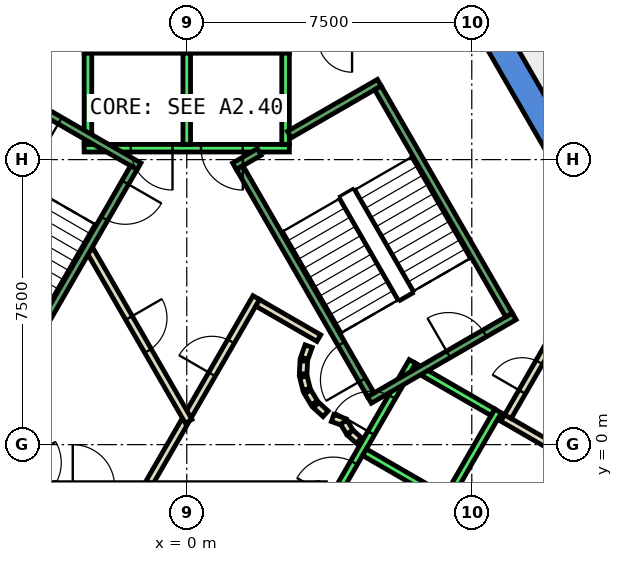
"""IFC4 building model, lengths in metres.
Left out: names, types, materials, properties, quantities, classifications, styles, units other than length and angle.
Written with IfcOpenShell. Run it as: python <this file> out.ifc"""

import sys

from ifc_helpers import new_model, si_unit, direction, frame, frame_2d, origin, place, context, subcontext, project, spatial, polyline, rectangle, outline, extrude, element, fill, save


model = new_model("IFC4")
c1 = context("Model", 3, precision=1e-05, world=origin(), true_north=direction((0.0, 1.0)))
c2 = subcontext(c1, "Body", "Model", "MODEL_VIEW")
j1 = project(units=[si_unit("LENGTHUNIT", "METRE"), si_unit("PLANEANGLEUNIT", "RADIAN")], contexts=[c1])
p1 = place(None, origin())
s1 = spatial("IfcSite", under=j1, at=p1, CompositionType="ELEMENT")
p2 = place(p1, origin())
s2 = spatial("IfcBuilding", under=s1, at=p2, CompositionType="ELEMENT")
p3 = place(p2, frame((0.0, 0.0, 198.2)))
s3 = spatial("IfcBuildingStorey", under=s2, at=p3, CompositionType="ELEMENT", Elevation=198.2)
p4 = place(p3, frame((0.0, 0.0, -0.4)))
e1 = element("IfcWall", 1, at=p4, inside=s3, PredefinedType="SHEAR", context=c2, shape_type="SweptSolid", body=[
    extrude(outline(polyline([(8.084, 11.498), (7.478, 11.148), (12.471, 2.5), (13.279, 2.5), (8.084, 11.498)])), origin(), (0.0, 0.0, 1.0), 4.2),
])
p5 = place(p3, frame((0.0, 0.0, -0.4)))
e2 = element("IfcWall", 2, at=p5, inside=s3, PredefinedType="SHEAR", context=c2, shape_type="SweptSolid", body=[
    extrude(outline(polyline([(6.64, -9.0), (13.279, 2.5), (12.471, 2.5), (6.235, -8.3), (6.64, -9.0)])), origin(), (0.0, 0.0, 1.0), 4.2),
])
p6 = place(p3, frame((10.653, -0.648, 0.0), z_axis=(0.0, 0.0, 1.0), x_axis=(-0.866036505625, 0.499980770555, 0.0)))
e3 = element("IfcWall", 3, at=p6, inside=s3, PredefinedType="PARTITIONING", context=c2, shape_type="SweptSolid", body=[
    extrude(rectangle(XDim=2.7, YDim=0.2, at=frame_2d((1.35, 0.0))), origin(), (0.0, 0.0, 1.0), 3.8),
])
p7 = place(p3, frame((8.451, 0.738, 0.0), z_axis=(0.0, 0.0, 1.0), x_axis=(0.499913221443, 0.866075499611, 0.0)))
e4 = element("IfcWall", 4, at=p7, inside=s3, PredefinedType="PARTITIONING", context=c2, shape_type="SweptSolid", body=[
    extrude(rectangle(XDim=2.4, YDim=0.2, at=frame_2d((1.2, 0.0))), origin(), (0.0, 0.0, 1.0), 3.8),
])
p8 = place(p7, frame((0.75, 0.0, 0.0)))
e5 = element("IfcOpeningElement", 5, at=p8, cuts=e4, PredefinedType="OPENING", context=c2, shape_type="SweptSolid", body=[
    extrude(rectangle(XDim=0.9, YDim=2.1, at=frame_2d((0.45, 1.05))), frame((0.0, 0.11, 0.0), z_axis=(0.0, -1.0, 0.0), x_axis=(1.0, 0.0, 0.0)), (0.0, 0.0, 1.0), 0.22),
])
p9 = place(p3, frame((-0.982, -1.0, 0.0), z_axis=(0.0, 0.0, 1.0), x_axis=(0.50024047865, 0.865886518847, 0.0)))
e6 = element("IfcWall", 6, at=p9, inside=s3, PredefinedType="PARTITIONING", context=c2, shape_type="SweptSolid", body=[
    extrude(rectangle(XDim=1.863, YDim=0.2, at=frame_2d((0.931, 0.0))), origin(), (0.0, 0.0, 1.0), 3.8),
])
p10 = place(p3, frame((0.05, 0.787, 0.0), z_axis=(0.0, 0.0, 1.0), x_axis=(0.499954076797, 0.866051915934, 0.0)))
e7 = element("IfcWall", 7, at=p10, inside=s3, PredefinedType="PARTITIONING", context=c2, shape_type="SweptSolid", body=[
    extrude(rectangle(XDim=3.558, YDim=0.2, at=frame_2d((1.779, 0.0))), origin(), (0.0, 0.0, 1.0), 3.8),
])
p11 = place(p10, frame((1.229, 0.0, 0.0)))
e8 = element("IfcOpeningElement", 8, at=p11, cuts=e7, PredefinedType="OPENING", context=c2, shape_type="SweptSolid", body=[
    extrude(rectangle(XDim=1.0, YDim=2.1, at=frame_2d((0.5, 1.05))), frame((0.0, 0.11, 0.0), z_axis=(0.0, -1.0, 0.0), x_axis=(1.0, 0.0, 0.0)), (0.0, 0.0, 1.0), 0.22),
])
p12 = place(p3, frame((1.866, 3.732, 0.0), z_axis=(0.0, 0.0, 1.0), x_axis=(0.866043361281, -0.499968895414, 0.0)))
e9 = element("IfcWall", 9, at=p12, inside=s3, PredefinedType="PARTITIONING", context=c2, shape_type="SweptSolid", body=[
    extrude(rectangle(XDim=1.858, YDim=0.2, at=frame_2d((0.929, 0.0))), origin(), (0.0, 0.0, 1.0), 3.8),
])
p13 = place(p3, frame((3.208, 2.592, 0.0), z_axis=(0.0, 0.0, 1.0), x_axis=(-0.337388820924, -0.941365382578, 0.0)))
e10 = element("IfcWall", 10, at=p13, inside=s3, PredefinedType="PARTITIONING", context=c2, shape_type="SweptSolid", body=[
    extrude(rectangle(XDim=0.338, YDim=0.2, at=frame_2d((0.169, 0.0))), origin(), (0.0, 0.0, 1.0), 3.8),
])
p14 = place(p3, frame((3.079, 2.199, 0.0), z_axis=(0.0, 0.0, 1.0), x_axis=(-0.047771483479, -0.998858290933, 0.0)))
e11 = element("IfcWall", 11, at=p14, inside=s3, PredefinedType="PARTITIONING", context=c2, shape_type="SweptSolid", body=[
    extrude(rectangle(XDim=0.337, YDim=0.2, at=frame_2d((0.169, 0.0))), origin(), (0.0, 0.0, 1.0), 3.8),
])
p15 = place(p3, frame((3.07, 1.786, 0.0), z_axis=(0.0, 0.0, 1.0), x_axis=(0.242705583207, -0.970099994784, 0.0)))
e12 = element("IfcWall", 12, at=p15, inside=s3, PredefinedType="PARTITIONING", context=c2, shape_type="SweptSolid", body=[
    extrude(rectangle(XDim=0.338, YDim=0.2, at=frame_2d((0.169, 0.0))), origin(), (0.0, 0.0, 1.0), 3.8),
])
for number, where, z_axis, x_axis in (
    (13, (3.182, 1.388, 0.0), (0.0, 0.0, 1.0), (0.512, -0.859, 0.0)),
    (14, (3.404, 1.039, 0.0), (0.0, 0.0, 1.0), (0.74, -0.672, 0.0)),
):
    element("IfcWall", number, at=place(p3, frame(where, z_axis=z_axis, x_axis=x_axis)), inside=s3, PredefinedType="PARTITIONING", context=c2, shape_type="SweptSolid", body=[
        extrude(rectangle(XDim=0.338, YDim=0.2, at=frame_2d((0.169, 0.0))), origin(), (0.0, 0.0, 1.0), 3.8),
    ])
p16 = place(p3, frame((3.838, 0.702, 0.0), z_axis=(0.0, 0.0, 1.0), x_axis=(0.941035081519, -0.338308993895, 0.0)))
e15 = element("IfcWall", 15, at=p16, inside=s3, PredefinedType="PARTITIONING", context=c2, shape_type="SweptSolid", body=[
    extrude(rectangle(XDim=0.337, YDim=0.2, at=frame_2d((0.168, 0.0))), origin(), (0.0, 0.0, 1.0), 3.8),
])
p17 = place(p3, frame((4.132, 0.593, 0.0), z_axis=(0.0, 0.0, 1.0), x_axis=(0.513561617048, -0.858052717201, 0.0)))
e16 = element("IfcWall", 16, at=p17, inside=s3, PredefinedType="PARTITIONING", context=c2, shape_type="SweptSolid", body=[
    extrude(rectangle(XDim=0.308, YDim=0.2, at=frame_2d((0.154, 0.0))), origin(), (0.0, 0.0, 1.0), 3.8),
])
p18 = place(p3, frame((4.301, 0.315, 0.0), z_axis=(0.0, 0.0, 1.0), x_axis=(0.741798017506, -0.670623367639, 0.0)))
e17 = element("IfcWall", 17, at=p18, inside=s3, PredefinedType="PARTITIONING", context=c2, shape_type="SweptSolid", body=[
    extrude(rectangle(XDim=0.309, YDim=0.2, at=frame_2d((0.154, 0.0))), origin(), (0.0, 0.0, 1.0), 3.8),
])
p19 = place(p3, frame((-2.54, 5.1, 0.0), z_axis=(0.0, 0.0, 1.0), x_axis=(0.499925051871, -0.866068670783, 0.0)))
e18 = element("IfcWall", 18, at=p19, inside=s3, PredefinedType="PARTITIONING", context=c2, shape_type="SweptSolid", body=[
    extrude(rectangle(XDim=5.181, YDim=0.2, at=frame_2d((2.59, 0.0))), origin(), (0.0, 0.0, 1.0), 3.8),
])
p20 = place(p19, frame((2.04, 0.0, 0.0)))
e19 = element("IfcOpeningElement", 19, at=p20, cuts=e18, PredefinedType="OPENING", context=c2, shape_type="SweptSolid", body=[
    extrude(rectangle(XDim=1.0, YDim=2.1, at=frame_2d((0.5, 1.05))), frame((0.0, 0.11, 0.0), z_axis=(0.0, -1.0, 0.0), x_axis=(1.0, 0.0, 0.0)), (0.0, 0.0, 1.0), 0.22),
])
p21 = place(p3, frame((2.7, 7.8, 0.0), z_axis=(0.0, 0.0, 1.0), x_axis=(-1.0, 0.0, 0.0)))
e20 = element("IfcWall", 20, at=p21, inside=s3, PredefinedType="STANDARD", context=c2, shape_type="SweptSolid", body=[
    extrude(rectangle(XDim=5.4, YDim=0.2, at=frame_2d((2.7, 0.0))), origin(), (0.0, 0.0, 1.0), 3.8),
])
p22 = place(p21, frame((1.225, 0.0, 0.0)))
e21 = element("IfcOpeningElement", 21, at=p22, cuts=e20, PredefinedType="OPENING", context=c2, shape_type="SweptSolid", body=[
    extrude(rectangle(XDim=1.1, YDim=2.1, at=frame_2d((0.55, 1.05))), frame((0.0, 0.11, 0.0), z_axis=(0.0, -1.0, 0.0), x_axis=(1.0, 0.0, 0.0)), (0.0, 0.0, 1.0), 0.22),
])
p23 = place(p21, frame((3.075, 0.0, 0.0)))
e22 = element("IfcOpeningElement", 22, at=p23, cuts=e20, PredefinedType="OPENING", context=c2, shape_type="SweptSolid", body=[
    extrude(rectangle(XDim=1.1, YDim=2.1, at=frame_2d((0.55, 1.05))), frame((0.0, 0.11, 0.0), z_axis=(0.0, -1.0, 0.0), x_axis=(1.0, 0.0, 0.0)), (0.0, 0.0, 1.0), 0.22),
])
p24 = place(p3, frame((2.7, 10.4, 0.0), z_axis=(0.0, 0.0, 1.0), x_axis=(-1.0, 0.0, 0.0)))
e23 = element("IfcWall", 23, at=p24, inside=s3, PredefinedType="STANDARD", context=c2, shape_type="SweptSolid", body=[
    extrude(rectangle(XDim=5.4, YDim=0.2, at=frame_2d((2.7, 0.0))), origin(), (0.0, 0.0, 1.0), 3.8),
])
for number, where, z_axis, x_axis in (
    (24, (2.6, 7.9, 0.0), (0.0, 0.0, 1.0), (0.0, 1.0, 0.0)),
    (25, (0.0, 7.9, 0.0), (0.0, 0.0, 1.0), (0.0, 1.0, 0.0)),
    (26, (-2.6, 7.9, 0.0), (0.0, 0.0, 1.0), (0.0, 1.0, 0.0)),
):
    element("IfcWall", number, at=place(p3, frame(where, z_axis=z_axis, x_axis=x_axis)), inside=s3, PredefinedType="STANDARD", context=c2, shape_type="SweptSolid", body=[
        extrude(rectangle(XDim=2.4, YDim=0.2, at=frame_2d((1.2, 0.0))), origin(), (0.0, 0.0, 1.0), 3.8),
    ])
p25 = place(p3, frame((-5.94, 2.188, 0.0), z_axis=(0.0, 0.0, 1.0), x_axis=(0.500034260056, -0.866005622828, 0.0)))
e27 = element("IfcWall", 27, at=p25, inside=s3, PredefinedType="STANDARD", context=c2, shape_type="SweptSolid", body=[
    extrude(rectangle(XDim=5.399, YDim=0.2, at=frame_2d((2.7, 0.0))), origin(), (0.0, 0.0, 1.0), 3.8),
])
p26 = place(p25, frame((3.075, 0.0, 0.0)))
e28 = element("IfcOpeningElement", 28, at=p26, cuts=e27, PredefinedType="OPENING", context=c2, shape_type="SweptSolid", body=[
    extrude(rectangle(XDim=1.1, YDim=2.1, at=frame_2d((0.55, 1.05))), frame((0.0, 0.11, 0.0), z_axis=(0.0, -1.0, 0.0), x_axis=(1.0, 0.0, 0.0)), (0.0, 0.0, 1.0), 0.22),
])
p27 = place(p25, frame((1.225, 0.0, 0.0)))
e29 = element("IfcOpeningElement", 29, at=p27, cuts=e27, PredefinedType="OPENING", context=c2, shape_type="SweptSolid", body=[
    extrude(rectangle(XDim=1.1, YDim=2.1, at=frame_2d((0.55, 1.05))), frame((0.0, 0.11, 0.0), z_axis=(0.0, -1.0, 0.0), x_axis=(1.0, 0.0, 0.0)), (0.0, 0.0, 1.0), 0.22),
])
p28 = place(p3, frame((3.24, -2.488, 0.0), z_axis=(0.0, 0.0, 1.0), x_axis=(0.500034260056, 0.866005622828, 0.0)))
e30 = element("IfcWall", 30, at=p28, inside=s3, PredefinedType="STANDARD", context=c2, shape_type="SweptSolid", body=[
    extrude(rectangle(XDim=5.399, YDim=0.2, at=frame_2d((2.7, 0.0))), origin(), (0.0, 0.0, 1.0), 3.8),
])
p29 = place(p28, frame((3.225, 0.0, 0.0)))
e31 = element("IfcOpeningElement", 31, at=p29, cuts=e30, PredefinedType="OPENING", context=c2, shape_type="SweptSolid", body=[
    extrude(rectangle(XDim=1.1, YDim=2.1, at=frame_2d((0.55, 1.05))), frame((0.0, 0.11, 0.0), z_axis=(0.0, -1.0, 0.0), x_axis=(1.0, 0.0, 0.0)), (0.0, 0.0, 1.0), 0.22),
])
p30 = place(p28, frame((1.225, 0.0, 0.0)))
e32 = element("IfcOpeningElement", 32, at=p30, cuts=e30, PredefinedType="OPENING", context=c2, shape_type="SweptSolid", body=[
    extrude(rectangle(XDim=1.1, YDim=2.1, at=frame_2d((0.55, 1.05))), frame((0.0, 0.11, 0.0), z_axis=(0.0, -1.0, 0.0), x_axis=(1.0, 0.0, 0.0)), (0.0, 0.0, 1.0), 0.22),
])
p31 = place(p3, frame((5.492, -3.788, 0.0), z_axis=(0.0, 0.0, 1.0), x_axis=(0.500034260056, 0.866005622828, 0.0)))
e33 = element("IfcWall", 33, at=p31, inside=s3, PredefinedType="STANDARD", context=c2, shape_type="SweptSolid", body=[
    extrude(rectangle(XDim=5.399, YDim=0.2, at=frame_2d((2.7, 0.0))), origin(), (0.0, 0.0, 1.0), 3.8),
])
for number, where, z_axis, x_axis in (
    (34, (4.677, -0.2, 0.0), (0.0, 0.0, 1.0), (0.866, -0.5, 0.0)),
    (35, (5.977, 2.052, 0.0), (0.0, 0.0, 1.0), (0.866, -0.5, 0.0)),
):
    element("IfcWall", number, at=place(p3, frame(where, z_axis=z_axis, x_axis=x_axis)), inside=s3, PredefinedType="STANDARD", context=c2, shape_type="SweptSolid", body=[
        extrude(rectangle(XDim=2.399, YDim=0.2, at=frame_2d((1.2, 0.0))), origin(), (0.0, 0.0, 1.0), 3.8),
    ])
p32 = place(p3, frame((4.806, 1.176, 0.0), z_axis=(0.0, 0.0, 1.0), x_axis=(0.866059941101, 0.499940174841, 0.0)))
e36 = element("IfcWall", 36, at=p32, inside=s3, PredefinedType="STANDARD", context=c2, shape_type="SweptSolid", body=[
    extrude(rectangle(XDim=4.4, YDim=0.2, at=frame_2d((2.2, 0.0))), origin(), (0.0, 0.0, 1.0), 3.8),
])
p33 = place(p32, frame((2.4, 0.0, 0.0)))
e37 = element("IfcOpeningElement", 37, at=p33, cuts=e36, PredefinedType="OPENING", context=c2, shape_type="SweptSolid", body=[
    extrude(rectangle(XDim=1.1, YDim=2.2, at=frame_2d((0.55, 1.1))), frame((0.0, 0.11, 0.0), z_axis=(0.0, -1.0, 0.0), x_axis=(1.0, 0.0, 0.0)), (0.0, 0.0, 1.0), 0.22),
])
p34 = place(p3, frame((2.7, 8.158, 0.0), z_axis=(0.0, 0.0, 1.0), x_axis=(0.86611865017, 0.499838457731, 0.0)))
e38 = element("IfcWall", 38, at=p34, inside=s3, PredefinedType="STANDARD", context=c2, shape_type="SweptSolid", body=[
    extrude(rectangle(XDim=2.733, YDim=0.2, at=frame_2d((1.366, 0.0))), origin(), (0.0, 0.0, 1.0), 3.8),
])
p35 = place(p3, frame((1.256, 7.324, 0.0), z_axis=(0.0, 0.0, 1.0), x_axis=(0.865915093549, 0.500191014278, 0.0)))
e39 = element("IfcWall", 39, at=p35, inside=s3, PredefinedType="STANDARD", context=c2, shape_type="SweptSolid", body=[
    extrude(rectangle(XDim=0.752, YDim=0.2, at=frame_2d((0.376, 0.0))), origin(), (0.0, 0.0, 1.0), 3.8),
])
p36 = place(p3, frame((4.843, 1.312, 0.0), z_axis=(0.0, 0.0, 1.0), x_axis=(-0.499963383562, 0.866046543262, 0.0)))
e40 = element("IfcWall", 40, at=p36, inside=s3, PredefinedType="STANDARD", context=c2, shape_type="SweptSolid", body=[
    extrude(rectangle(XDim=6.9, YDim=0.2, at=frame_2d((3.45, 0.0))), origin(), (0.0, 0.0, 1.0), 3.8),
])
p37 = place(p36, frame((0.45, 0.0, 0.0)))
e41 = element("IfcOpeningElement", 41, at=p37, cuts=e40, PredefinedType="OPENING", context=c2, shape_type="SweptSolid", body=[
    extrude(rectangle(XDim=1.1, YDim=2.2, at=frame_2d((0.55, 1.1))), frame((0.0, 0.11, 0.0), z_axis=(0.0, -1.0, 0.0), x_axis=(1.0, 0.0, 0.0)), (0.0, 0.0, 1.0), 0.22),
])
p38 = place(p3, frame((8.48, 3.412, 0.0), z_axis=(0.0, 0.0, 1.0), x_axis=(-0.499978703459, 0.866037698999, 0.0)))
e42 = element("IfcWall", 42, at=p38, inside=s3, PredefinedType="STANDARD", context=c2, shape_type="SweptSolid", body=[
    extrude(rectangle(XDim=6.9, YDim=0.2, at=frame_2d((3.45, 0.0))), origin(), (0.0, 0.0, 1.0), 3.8),
])
p39 = place(p3, frame((-1.256, 7.324, 0.0), z_axis=(0.0, 0.0, 1.0), x_axis=(-0.866046073146, 0.499964197906, 0.0)))
e43 = element("IfcWall", 43, at=p39, inside=s3, PredefinedType="STANDARD", context=c2, shape_type="SweptSolid", body=[
    extrude(rectangle(XDim=4.4, YDim=0.2, at=frame_2d((2.2, 0.0))), origin(), (0.0, 0.0, 1.0), 3.8),
])
p40 = place(p39, frame((2.4, 0.0, 0.0)))
e44 = element("IfcOpeningElement", 44, at=p40, cuts=e43, PredefinedType="OPENING", context=c2, shape_type="SweptSolid", body=[
    extrude(rectangle(XDim=1.1, YDim=2.2, at=frame_2d((0.55, 1.1))), frame((0.0, 0.11, 0.0), z_axis=(0.0, -1.0, 0.0), x_axis=(1.0, 0.0, 0.0)), (0.0, 0.0, 1.0), 0.22),
])
p41 = place(p3, frame((-1.393, 7.288, 0.0), z_axis=(0.0, 0.0, 1.0), x_axis=(-0.499963383562, -0.866046543262, 0.0)))
e45 = element("IfcWall", 45, at=p41, inside=s3, PredefinedType="STANDARD", context=c2, shape_type="SweptSolid", body=[
    extrude(rectangle(XDim=6.9, YDim=0.2, at=frame_2d((3.45, 0.0))), origin(), (0.0, 0.0, 1.0), 3.8),
])
p42 = place(p41, frame((0.45, 0.0, 0.0)))
e46 = element("IfcOpeningElement", 46, at=p42, cuts=e45, PredefinedType="OPENING", context=c2, shape_type="SweptSolid", body=[
    extrude(rectangle(XDim=1.1, YDim=2.2, at=frame_2d((0.55, 1.1))), frame((0.0, 0.11, 0.0), z_axis=(0.0, -1.0, 0.0), x_axis=(1.0, 0.0, 0.0)), (0.0, 0.0, 1.0), 0.22),
])
p43 = place(p11, origin())
e47 = element("IfcDoor", 47, at=p43, inside=s3, OperationType="SINGLE_SWING_RIGHT", PredefinedType="DOOR", context=c2, shape_type="SweptSolid", body=[
    extrude(rectangle(XDim=1.0, YDim=2.1, at=frame_2d((0.5, 1.05))), frame((0.0, 0.025, 0.0), z_axis=(0.0, -1.0, 0.0), x_axis=(1.0, 0.0, 0.0)), (0.0, 0.0, 1.0), 0.05),
])
fill(e8, e47)
p44 = place(p20, origin())
e48 = element("IfcDoor", 48, at=p44, inside=s3, OperationType="SINGLE_SWING_RIGHT", PredefinedType="DOOR", context=c2, shape_type="SweptSolid", body=[
    extrude(rectangle(XDim=1.0, YDim=2.1, at=frame_2d((0.5, 1.05))), frame((0.0, 0.025, 0.0), z_axis=(0.0, -1.0, 0.0), x_axis=(1.0, 0.0, 0.0)), (0.0, 0.0, 1.0), 0.05),
])
fill(e19, e48)
p45 = place(p8, origin())
e49 = element("IfcDoor", 49, at=p45, inside=s3, OperationType="SINGLE_SWING_LEFT", PredefinedType="DOOR", context=c2, shape_type="SweptSolid", body=[
    extrude(rectangle(XDim=0.9, YDim=2.1, at=frame_2d((0.45, 1.05))), frame((0.0, 0.025, 0.0), z_axis=(0.0, -1.0, 0.0), x_axis=(1.0, 0.0, 0.0)), (0.0, 0.0, 1.0), 0.05),
])
fill(e5, e49)
p46 = place(p22, origin())
e50 = element("IfcDoor", 50, at=p46, inside=s3, OperationType="SLIDING_TO_LEFT", PredefinedType="DOOR", context=c2, shape_type="SweptSolid", body=[
    extrude(rectangle(XDim=1.1, YDim=2.1, at=frame_2d((0.55, 1.05))), frame((0.0, 0.025, 0.0), z_axis=(0.0, -1.0, 0.0), x_axis=(1.0, 0.0, 0.0)), (0.0, 0.0, 1.0), 0.05),
])
fill(e21, e50)
p47 = place(p23, origin())
e51 = element("IfcDoor", 51, at=p47, inside=s3, OperationType="SLIDING_TO_LEFT", PredefinedType="DOOR", context=c2, shape_type="SweptSolid", body=[
    extrude(rectangle(XDim=1.1, YDim=2.1, at=frame_2d((0.55, 1.05))), frame((0.0, 0.025, 0.0), z_axis=(0.0, -1.0, 0.0), x_axis=(1.0, 0.0, 0.0)), (0.0, 0.0, 1.0), 0.05),
])
fill(e22, e51)
p48 = place(p29, origin())
e52 = element("IfcDoor", 52, at=p48, inside=s3, OperationType="SLIDING_TO_LEFT", PredefinedType="DOOR", context=c2, shape_type="SweptSolid", body=[
    extrude(rectangle(XDim=1.1, YDim=2.1, at=frame_2d((0.55, 1.05))), frame((0.0, 0.025, 0.0), z_axis=(0.0, -1.0, 0.0), x_axis=(1.0, 0.0, 0.0)), (0.0, 0.0, 1.0), 0.05),
])
fill(e31, e52)
p49 = place(p30, origin())
e53 = element("IfcDoor", 53, at=p49, inside=s3, OperationType="SLIDING_TO_LEFT", PredefinedType="DOOR", context=c2, shape_type="SweptSolid", body=[
    extrude(rectangle(XDim=1.1, YDim=2.1, at=frame_2d((0.55, 1.05))), frame((0.0, 0.025, 0.0), z_axis=(0.0, -1.0, 0.0), x_axis=(1.0, 0.0, 0.0)), (0.0, 0.0, 1.0), 0.05),
])
fill(e32, e53)
p50 = place(p37, origin())
e54 = element("IfcDoor", 54, at=p50, inside=s3, OperationType="SINGLE_SWING_LEFT", PredefinedType="DOOR", context=c2, shape_type="SweptSolid", body=[
    extrude(rectangle(XDim=1.1, YDim=2.2, at=frame_2d((0.55, 1.1))), frame((0.0, 0.025, 0.0), z_axis=(0.0, -1.0, 0.0), x_axis=(1.0, 0.0, 0.0)), (0.0, 0.0, 1.0), 0.05),
])
fill(e41, e54)
p51 = place(p33, origin())
e55 = element("IfcDoor", 55, at=p51, inside=s3, OperationType="SINGLE_SWING_LEFT", PredefinedType="DOOR", context=c2, shape_type="SweptSolid", body=[
    extrude(rectangle(XDim=1.1, YDim=2.2, at=frame_2d((0.55, 1.1))), frame((0.0, 0.025, 0.0), z_axis=(0.0, -1.0, 0.0), x_axis=(1.0, 0.0, 0.0)), (0.0, 0.0, 1.0), 0.05),
])
fill(e37, e55)
p52 = place(p42, origin())
e56 = element("IfcDoor", 56, at=p52, inside=s3, OperationType="SINGLE_SWING_LEFT", PredefinedType="DOOR", context=c2, shape_type="SweptSolid", body=[
    extrude(rectangle(XDim=1.1, YDim=2.2, at=frame_2d((0.55, 1.1))), frame((0.0, 0.025, 0.0), z_axis=(0.0, -1.0, 0.0), x_axis=(1.0, 0.0, 0.0)), (0.0, 0.0, 1.0), 0.05),
])
fill(e46, e56)
p53 = place(p40, origin())
e57 = element("IfcDoor", 57, at=p53, inside=s3, OperationType="SINGLE_SWING_LEFT", PredefinedType="DOOR", context=c2, shape_type="SweptSolid", body=[
    extrude(rectangle(XDim=1.1, YDim=2.2, at=frame_2d((0.55, 1.1))), frame((0.0, 0.025, 0.0), z_axis=(0.0, -1.0, 0.0), x_axis=(1.0, 0.0, 0.0)), (0.0, 0.0, 1.0), 0.05),
])
fill(e44, e57)
save(model, sys.argv[1])
